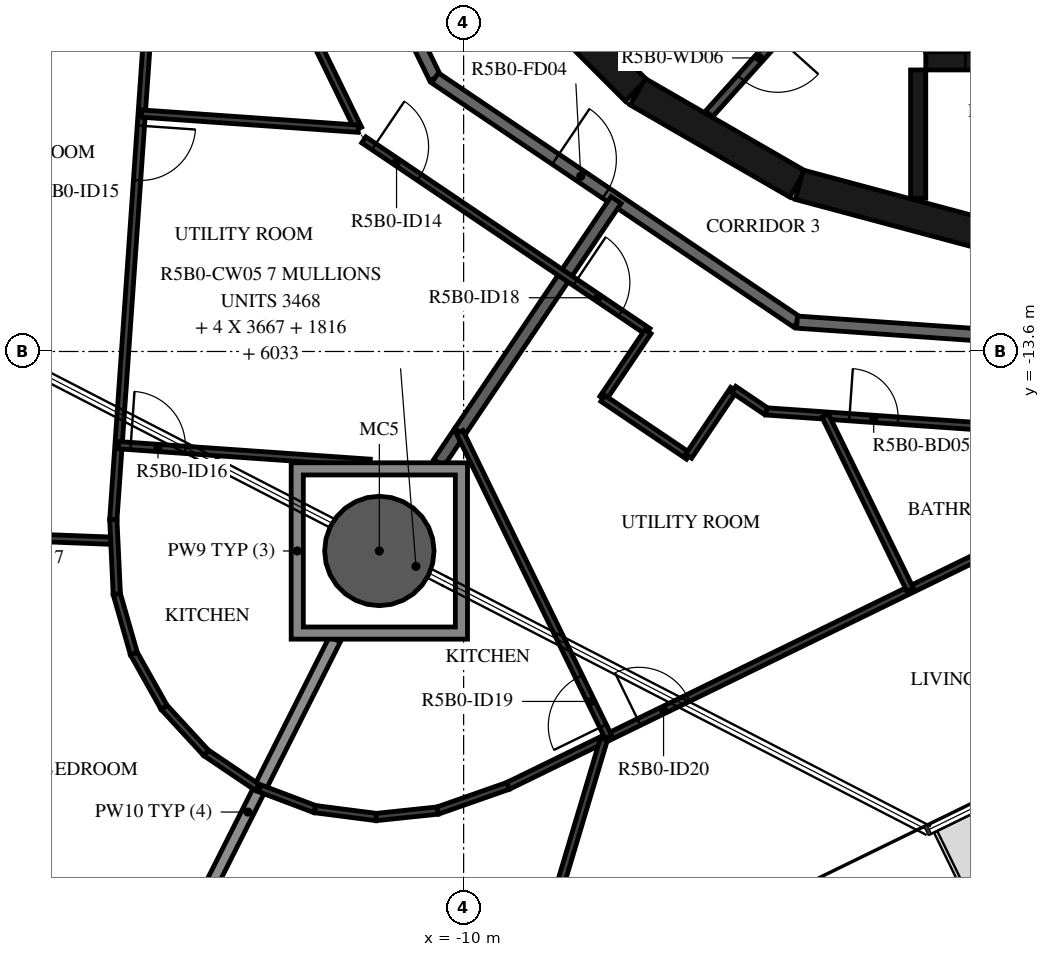
"""IFC4 building model, lengths in metres.
Left out: names, types, materials, properties, quantities, classifications, styles, units other than length and angle.
Written with IfcOpenShell. Run it as: python <this file> out.ifc"""

import sys

from ifc_helpers import new_model, si_unit, direction, frame, frame_2d, origin, origin_2d, place, context, subcontext, project, spatial, polyline, rectangle, hollow_circle, outline, extrude, element, fill, save


model = new_model("IFC4")
c1 = context("Model", 3, precision=1e-05, world=origin(), true_north=direction((0.0, 1.0)))
c2 = subcontext(c1, "Body", "Model", "MODEL_VIEW")
j1 = project(units=[si_unit("LENGTHUNIT", "METRE"), si_unit("PLANEANGLEUNIT", "RADIAN")], contexts=[c1])
p1 = place(None, origin())
s1 = spatial("IfcSite", under=j1, at=p1, CompositionType="ELEMENT")
p2 = place(p1, origin())
s2 = spatial("IfcBuilding", under=s1, at=p2, CompositionType="ELEMENT")
p3 = place(p2, frame((0.0, 0.0, 202.4)))
s3 = spatial("IfcBuildingStorey", under=s2, at=p3, CompositionType="ELEMENT", Elevation=202.4)
p4 = place(p3, frame((-11.386, -16.881, -0.38), z_axis=(0.0, 0.0, 1.0), x_axis=(1.0, 0.0, 0.0)))
e1 = element("IfcColumn", 1, at=p4, inside=s3, PredefinedType="COLUMN", context=c2, shape_type="SweptSolid", body=[
    extrude(hollow_circle(Radius=0.9, WallThickness=0.04, at=origin_2d()), origin(), (0.0, 0.0, 1.0), 3.5),
])
p5 = place(p3, frame((-9.308, -7.164, 0.0), z_axis=(0.0, 0.0, 1.0), x_axis=(0.707106781187, -0.707106781187, 0.0)))
e2 = element("IfcWall", 2, at=p5, inside=s3, PredefinedType="SHEAR", context=c2, shape_type="SweptSolid", body=[
    extrude(rectangle(XDim=3.032, YDim=0.5, at=frame_2d((1.516, 0.0))), origin(), (0.0, 0.0, 1.0), 3.12),
])
for number, where, z_axis, x_axis in (
    (3, (-7.137, -9.329, 0.0), (0.0, 0.0, 1.0), (0.866, -0.5, 0.0)),
    (4, (-4.479, -10.858, 0.0), (0.0, 0.0, 1.0), (0.966, -0.259, 0.0)),
):
    element("IfcWall", number, at=place(p3, frame(where, z_axis=z_axis, x_axis=x_axis)), inside=s3, PredefinedType="SHEAR", context=c2, shape_type="SweptSolid", body=[
        extrude(rectangle(XDim=3.033, YDim=0.5, at=frame_2d((1.516, 0.0))), origin(), (0.0, 0.0, 1.0), 3.12),
    ])
p6 = place(p3, frame((-2.4, -8.82, 0.0), z_axis=(0.0, 0.0, 1.0), x_axis=(1.0, 0.0, 0.0)))
e5 = element("IfcWall", 5, at=p6, inside=s3, PredefinedType="SHEAR", context=c2, shape_type="SweptSolid", body=[
    extrude(rectangle(XDim=2.5, YDim=0.3, at=frame_2d((1.25, 0.0))), origin(), (0.0, 0.0, 1.0), 3.12),
])
p7 = place(p6, frame((0.65, 0.0, 0.0)))
e6 = element("IfcOpeningElement", 6, at=p7, cuts=e5, PredefinedType="OPENING", context=c2, shape_type="SweptSolid", body=[
    extrude(rectangle(XDim=1.2, YDim=2.1, at=frame_2d((0.6, 1.05))), frame((0.0, 0.16, 0.0), z_axis=(0.0, -1.0, 0.0), x_axis=(1.0, 0.0, 0.0)), (0.0, 0.0, 1.0), 0.32),
])
p8 = place(p3, frame((-2.525, -8.97, 0.0), z_axis=(0.0, 0.0, 1.0), x_axis=(0.0, -1.0, 0.0)))
e7 = element("IfcWall", 7, at=p8, inside=s3, PredefinedType="SHEAR", context=c2, shape_type="SweptSolid", body=[
    extrude(rectangle(XDim=2.11, YDim=0.25, at=frame_2d((1.055, 0.0))), origin(), (0.0, 0.0, 1.0), 3.12),
])
p9 = place(p3, frame((-4.311, -7.851, 0.0), z_axis=(0.0, 0.0, 1.0), x_axis=(-0.667869133096, -0.744278725383, 0.0)))
e8 = element("IfcWall", 8, at=p9, inside=s3, PredefinedType="PARTITIONING", context=c2, shape_type="SweptSolid", body=[
    extrude(rectangle(XDim=2.476, YDim=0.15, at=frame_2d((1.238, 0.0))), origin(), (0.0, 0.0, 1.0), 3.12),
])
p10 = place(p9, frame((0.788, 0.0, 0.0)))
e9 = element("IfcOpeningElement", 9, at=p10, cuts=e8, PredefinedType="OPENING", context=c2, shape_type="SweptSolid", body=[
    extrude(rectangle(XDim=0.9, YDim=2.1, at=frame_2d((0.45, 1.05))), frame((0.0, 0.085, 0.0), z_axis=(0.0, -1.0, 0.0), x_axis=(1.0, 0.0, 0.0)), (0.0, 0.0, 1.0), 0.17),
])
p11 = place(p3, frame((-11.633, -6.716, 0.0), z_axis=(0.0, 0.0, 1.0), x_axis=(0.438322116278, -0.898817958422, 0.0)))
e10 = element("IfcWall", 10, at=p11, inside=s3, PredefinedType="STANDARD", context=c2, shape_type="SweptSolid", body=[
    extrude(rectangle(XDim=2.654, YDim=0.2, at=frame_2d((1.327, 0.0))), origin(), (0.0, 0.0, 1.0), 3.12),
])
p12 = place(p3, frame((-10.47, -9.101, 0.0), z_axis=(0.0, 0.0, 1.0), x_axis=(0.829035841718, -0.559195469534, 0.0)))
e11 = element("IfcWall", 11, at=p12, inside=s3, PredefinedType="STANDARD", context=c2, shape_type="SweptSolid", body=[
    extrude(rectangle(XDim=7.181, YDim=0.2, at=frame_2d((3.591, 0.0))), origin(), (0.0, 0.0, 1.0), 3.12),
])
p13 = place(p12, frame((2.39, 0.0, 0.0)))
e12 = element("IfcOpeningElement", 12, at=p13, cuts=e11, PredefinedType="OPENING", context=c2, shape_type="SweptSolid", body=[
    extrude(rectangle(XDim=1.0, YDim=2.1, at=frame_2d((0.5, 1.05))), frame((0.0, 0.11, 0.0), z_axis=(0.0, -1.0, 0.0), x_axis=(1.0, 0.0, 0.0)), (0.0, 0.0, 1.0), 0.22),
])
p14 = place(p3, frame((-4.517, -13.117, 0.0), z_axis=(0.0, 0.0, 1.0), x_axis=(0.997564669554, -0.069747616856, 0.0)))
e13 = element("IfcWall", 13, at=p14, inside=s3, PredefinedType="STANDARD", context=c2, shape_type="SweptSolid", body=[
    extrude(rectangle(XDim=6.885, YDim=0.2, at=frame_2d((3.443, 0.0))), origin(), (0.0, 0.0, 1.0), 3.12),
])
p15 = place(p14, frame((3.2, 0.0, 0.0)))
e14 = element("IfcOpeningElement", 14, at=p15, cuts=e13, PredefinedType="OPENING", context=c2, shape_type="SweptSolid", body=[
    extrude(rectangle(XDim=1.0, YDim=2.1, at=frame_2d((0.5, 1.05))), frame((0.0, 0.11, 0.0), z_axis=(0.0, -1.0, 0.0), x_axis=(1.0, 0.0, 0.0)), (0.0, 0.0, 1.0), 0.22),
])
p16 = place(p3, frame((-10.066, -14.924, 0.0), z_axis=(0.0, 0.0, 1.0), x_axis=(0.559173899945, 0.829050390278, 0.0)))
e15 = element("IfcWall", 15, at=p16, inside=s3, PredefinedType="STANDARD", context=c2, shape_type="SweptSolid", body=[
    extrude(rectangle(XDim=4.601, YDim=0.2, at=frame_2d((2.301, 0.0))), origin(), (0.0, 0.0, 1.0), 3.12),
])
p17 = place(p3, frame((-10.408, -15.43, 0.0), z_axis=(0.0, 0.0, 1.0), x_axis=(0.559390561924, 0.828904215956, 0.0)))
e16 = element("IfcWall", 16, at=p17, inside=s3, PredefinedType="STANDARD", context=c2, shape_type="SweptSolid", body=[
    extrude(rectangle(XDim=0.612, YDim=0.2, at=frame_2d((0.306, 0.0))), origin(), (0.0, 0.0, 1.0), 3.12),
])
p18 = place(p3, frame((-14.979, -24.017, 0.0), z_axis=(0.0, 0.0, 1.0), x_axis=(0.449711952388, 0.893173644864, 0.0)))
e17 = element("IfcWall", 17, at=p18, inside=s3, PredefinedType="STANDARD", context=c2, shape_type="SweptSolid", body=[
    extrude(rectangle(XDim=6.367, YDim=0.2, at=frame_2d((3.184, 0.0))), origin(), (0.0, 0.0, 1.0), 2.73),
])
p19 = place(p3, frame((-14.383, -4.5, 0.0), z_axis=(0.0, 0.0, 1.0), x_axis=(0.438393414895, -0.898783185077, 0.0)))
e18 = element("IfcWall", 18, at=p19, inside=s3, PredefinedType="PARTITIONING", context=c2, shape_type="SweptSolid", body=[
    extrude(rectangle(XDim=6.049, YDim=0.12, at=frame_2d((3.024, 0.0))), origin(), (0.0, 0.0, 1.0), 3.12),
])
p20 = place(p19, frame((0.4, 0.0, 0.0)))
e19 = element("IfcOpeningElement", 19, at=p20, cuts=e18, PredefinedType="OPENING", context=c2, shape_type="SweptSolid", body=[
    extrude(rectangle(XDim=0.8, YDim=2.1, at=frame_2d((0.4, 1.05))), frame((0.0, 0.07, 0.0), z_axis=(0.0, -1.0, 0.0), x_axis=(1.0, 0.0, 0.0)), (0.0, 0.0, 1.0), 0.14),
])
p21 = place(p3, frame((-11.642, -10.12, 0.0), z_axis=(0.0, 0.0, 1.0), x_axis=(0.829033377599, -0.559199122698, 0.0)))
e20 = element("IfcWall", 20, at=p21, inside=s3, PredefinedType="PARTITIONING", context=c2, shape_type="SweptSolid", body=[
    extrude(rectangle(XDim=5.638, YDim=0.12, at=frame_2d((2.819, 0.0))), origin(), (0.0, 0.0, 1.0), 3.12),
])
p22 = place(p21, frame((0.2, 0.0, 0.0)))
e21 = element("IfcOpeningElement", 21, at=p22, cuts=e20, PredefinedType="OPENING", context=c2, shape_type="SweptSolid", body=[
    extrude(rectangle(XDim=0.9, YDim=2.1, at=frame_2d((0.45, 1.05))), frame((0.0, 0.07, 0.0), z_axis=(0.0, -1.0, 0.0), x_axis=(1.0, 0.0, 0.0)), (0.0, 0.0, 1.0), 0.14),
])
p23 = place(p21, frame((4.192, 0.0, 0.0)))
e22 = element("IfcOpeningElement", 22, at=p23, cuts=e20, PredefinedType="OPENING", context=c2, shape_type="SweptSolid", body=[
    extrude(rectangle(XDim=0.9, YDim=2.1, at=frame_2d((0.45, 1.05))), frame((0.0, 0.07, 0.0), z_axis=(0.0, -1.0, 0.0), x_axis=(1.0, 0.0, 0.0)), (0.0, 0.0, 1.0), 0.14),
])
p24 = place(p3, frame((-14.931, -4.5, 0.0), z_axis=(0.0, 0.0, 1.0), x_axis=(-0.069751708439, -0.997564383471, 0.0)))
e23 = element("IfcWall", 23, at=p24, inside=s3, PredefinedType="PARTITIONING", context=c2, shape_type="SweptSolid", body=[
    extrude(rectangle(XDim=11.894, YDim=0.12, at=frame_2d((5.947, 0.0))), origin(), (0.0, 0.0, 1.0), 3.12),
])
p25 = place(p24, frame((5.4, 0.0, 0.0)))
e24 = element("IfcOpeningElement", 24, at=p25, cuts=e23, PredefinedType="OPENING", context=c2, shape_type="SweptSolid", body=[
    extrude(rectangle(XDim=0.9, YDim=2.1, at=frame_2d((0.45, 1.05))), frame((0.0, 0.07, 0.0), z_axis=(0.0, -1.0, 0.0), x_axis=(1.0, 0.0, 0.0)), (0.0, 0.0, 1.0), 0.14),
])
p26 = place(p3, frame((-15.294, -9.688, 0.0), z_axis=(0.0, 0.0, 1.0), x_axis=(0.997565819809, -0.069731163391, 0.0)))
e25 = element("IfcWall", 25, at=p26, inside=s3, PredefinedType="PARTITIONING", context=c2, shape_type="SweptSolid", body=[
    extrude(rectangle(XDim=3.571, YDim=0.12, at=frame_2d((1.786, 0.0))), origin(), (0.0, 0.0, 1.0), 3.12),
])
p27 = place(p3, frame((-19.355, -16.575, 0.0), z_axis=(0.0, 0.0, 1.0), x_axis=(0.999268343647, -0.038246272823, 0.0)))
e26 = element("IfcWall", 26, at=p27, inside=s3, PredefinedType="PARTITIONING", context=c2, shape_type="SweptSolid", body=[
    extrude(rectangle(XDim=3.613, YDim=0.12, at=frame_2d((1.807, 0.0))), origin(), (0.0, 0.0, 1.0), 3.12),
])
p28 = place(p27, frame((0.2, 0.0, 0.0)))
e27 = element("IfcOpeningElement", 27, at=p28, cuts=e26, PredefinedType="OPENING", context=c2, shape_type="SweptSolid", body=[
    extrude(rectangle(XDim=0.9, YDim=2.1, at=frame_2d((0.45, 1.05))), frame((0.0, 0.07, 0.0), z_axis=(0.0, -1.0, 0.0), x_axis=(1.0, 0.0, 0.0)), (0.0, 0.0, 1.0), 0.14),
])
p29 = place(p3, frame((-15.704, -17.59, 0.0), z_axis=(0.0, 0.0, 1.0), x_axis=(-0.046364428258, 0.998924591645, 0.0)))
e28 = element("IfcWall", 28, at=p29, inside=s3, PredefinedType="PARTITIONING", context=c2, shape_type="SweptSolid", body=[
    extrude(rectangle(XDim=1.227, YDim=0.12, at=frame_2d((0.613, 0.0))), origin(), (0.0, 0.0, 1.0), 3.12),
])
p30 = place(p3, frame((-15.675, -15.141, 0.0), z_axis=(0.0, 0.0, 1.0), x_axis=(0.997563107735, -0.06976995117, 0.0)))
e29 = element("IfcWall", 29, at=p30, inside=s3, PredefinedType="PARTITIONING", context=c2, shape_type="SweptSolid", body=[
    extrude(rectangle(XDim=4.146, YDim=0.12, at=frame_2d((2.073, 0.0))), origin(), (0.0, 0.0, 1.0), 3.12),
])
p31 = place(p30, frame((0.2, 0.0, 0.0)))
e30 = element("IfcOpeningElement", 30, at=p31, cuts=e29, PredefinedType="OPENING", context=c2, shape_type="SweptSolid", body=[
    extrude(rectangle(XDim=0.9, YDim=2.1, at=frame_2d((0.45, 1.05))), frame((0.0, 0.07, 0.0), z_axis=(0.0, -1.0, 0.0), x_axis=(1.0, 0.0, 0.0)), (0.0, 0.0, 1.0), 0.14),
])
for number, where, z_axis, x_axis in (
    (31, (-13.395, -20.767, 0.0), (0.0, 0.0, 1.0), (-0.829, 0.559, 0.0)),
    (32, (-14.237, -20.199, 0.0), (0.0, 0.0, 1.0), (-0.678, 0.735, 0.0)),
):
    element("IfcWall", number, at=place(p3, frame(where, z_axis=z_axis, x_axis=x_axis)), inside=s3, PredefinedType="PARTITIONING", context=c2, shape_type="SweptSolid", body=[
        extrude(rectangle(XDim=1.016, YDim=0.12, at=frame_2d((0.508, 0.0))), origin(), (0.0, 0.0, 1.0), 3.12),
    ])
p32 = place(p3, frame((-14.926, -19.452, 0.0), z_axis=(0.0, 0.0, 1.0), x_axis=(-0.489941776958, 0.871755157823, 0.0)))
e33 = element("IfcWall", 33, at=p32, inside=s3, PredefinedType="PARTITIONING", context=c2, shape_type="SweptSolid", body=[
    extrude(rectangle(XDim=1.016, YDim=0.12, at=frame_2d((0.508, 0.0))), origin(), (0.0, 0.0, 1.0), 3.12),
])
p33 = place(p3, frame((-15.424, -18.567, 0.0), z_axis=(0.0, 0.0, 1.0), x_axis=(-0.275641454312, 0.961260520704, 0.0)))
e34 = element("IfcWall", 34, at=p33, inside=s3, PredefinedType="PARTITIONING", context=c2, shape_type="SweptSolid", body=[
    extrude(rectangle(XDim=1.016, YDim=0.12, at=frame_2d((0.508, 0.0))), origin(), (0.0, 0.0, 1.0), 3.12),
])
p34 = place(p3, frame((-6.968, -13.273, 0.0), z_axis=(0.0, 0.0, 1.0), x_axis=(-0.559283007371, -0.828976789582, 0.0)))
e35 = element("IfcWall", 35, at=p34, inside=s3, PredefinedType="PARTITIONING", context=c2, shape_type="SweptSolid", body=[
    extrude(rectangle(XDim=1.325, YDim=0.12, at=frame_2d((0.663, 0.0))), origin(), (0.0, 0.0, 1.0), 3.12),
])
p35 = place(p3, frame((-7.709, -14.371, 0.0), z_axis=(0.0, 0.0, 1.0), x_axis=(0.829033422808, -0.559199055675, 0.0)))
e36 = element("IfcWall", 36, at=p35, inside=s3, PredefinedType="PARTITIONING", context=c2, shape_type="SweptSolid", body=[
    extrude(rectangle(XDim=1.7, YDim=0.12, at=frame_2d((0.85, 0.0))), origin(), (0.0, 0.0, 1.0), 3.12),
])
p36 = place(p3, frame((-6.3, -15.322, 0.0), z_axis=(0.0, 0.0, 1.0), x_axis=(0.559197608403, 0.829034399019, 0.0)))
e37 = element("IfcWall", 37, at=p36, inside=s3, PredefinedType="PARTITIONING", context=c2, shape_type="SweptSolid", body=[
    extrude(rectangle(XDim=1.325, YDim=0.12, at=frame_2d((0.663, 0.0))), origin(), (0.0, 0.0, 1.0), 3.12),
])
p37 = place(p3, frame((-5.559, -14.223, 0.0), z_axis=(0.0, 0.0, 1.0), x_axis=(0.828844300469, -0.559479334363, 0.0)))
e38 = element("IfcWall", 38, at=p37, inside=s3, PredefinedType="PARTITIONING", context=c2, shape_type="SweptSolid", body=[
    extrude(rectangle(XDim=0.647, YDim=0.12, at=frame_2d((0.324, 0.0))), origin(), (0.0, 0.0, 1.0), 3.12),
])
p38 = place(p3, frame((-5.022, -14.585, 0.0), z_axis=(0.0, 0.0, 1.0), x_axis=(0.997564196041, -0.06975438895, 0.0)))
e39 = element("IfcWall", 39, at=p38, inside=s3, PredefinedType="PARTITIONING", context=c2, shape_type="SweptSolid", body=[
    extrude(rectangle(XDim=7.346, YDim=0.12, at=frame_2d((3.673, 0.0))), origin(), (0.0, 0.0, 1.0), 3.12),
])
p39 = place(p38, frame((1.37, 0.0, 0.0)))
e40 = element("IfcOpeningElement", 40, at=p39, cuts=e39, PredefinedType="OPENING", context=c2, shape_type="SweptSolid", body=[
    extrude(rectangle(XDim=0.8, YDim=2.1, at=frame_2d((0.4, 1.05))), frame((0.0, 0.07, 0.0), z_axis=(0.0, -1.0, 0.0), x_axis=(1.0, 0.0, 0.0)), (0.0, 0.0, 1.0), 0.14),
])
p40 = place(p3, frame((-13.351, -20.784, 0.0), z_axis=(0.0, 0.0, 1.0), x_axis=(0.935644105077, -0.352944908781, 0.0)))
e41 = element("IfcWall", 41, at=p40, inside=s3, PredefinedType="PARTITIONING", context=c2, shape_type="SweptSolid", body=[
    extrude(rectangle(XDim=0.969, YDim=0.12, at=frame_2d((0.484, 0.0))), origin(), (0.0, 0.0, 1.0), 3.12),
])
p41 = place(p3, frame((-12.445, -21.126, 0.0), z_axis=(0.0, 0.0, 1.0), x_axis=(0.991824046735, -0.127612931625, 0.0)))
e42 = element("IfcWall", 42, at=p41, inside=s3, PredefinedType="PARTITIONING", context=c2, shape_type="SweptSolid", body=[
    extrude(rectangle(XDim=1.016, YDim=0.12, at=frame_2d((0.508, 0.0))), origin(), (0.0, 0.0, 1.0), 3.12),
])
p42 = place(p3, frame((-11.437, -21.256, 0.0), z_axis=(0.0, 0.0, 1.0), x_axis=(0.994522555527, 0.104522182086, 0.0)))
e43 = element("IfcWall", 43, at=p42, inside=s3, PredefinedType="PARTITIONING", context=c2, shape_type="SweptSolid", body=[
    extrude(rectangle(XDim=1.016, YDim=0.12, at=frame_2d((0.508, 0.0))), origin(), (0.0, 0.0, 1.0), 3.12),
])
p43 = place(p3, frame((-10.427, -21.149, 0.0), z_axis=(0.0, 0.0, 1.0), x_axis=(0.943591256744, 0.331112579338, 0.0)))
e44 = element("IfcWall", 44, at=p43, inside=s3, PredefinedType="PARTITIONING", context=c2, shape_type="SweptSolid", body=[
    extrude(rectangle(XDim=1.227, YDim=0.12, at=frame_2d((0.613, 0.0))), origin(), (0.0, 0.0, 1.0), 3.12),
])
p44 = place(p3, frame((-9.269, -20.743, 0.0), z_axis=(0.0, 0.0, 1.0), x_axis=(0.898796865831, 0.438365365846, 0.0)))
e45 = element("IfcWall", 45, at=p44, inside=s3, PredefinedType="PARTITIONING", context=c2, shape_type="SweptSolid", body=[
    extrude(rectangle(XDim=12.879, YDim=0.12, at=frame_2d((6.439, 0.0))), origin(), (0.0, 0.0, 1.0), 3.12),
])
p45 = place(p44, frame((2.395, 0.0, 0.0)))
e46 = element("IfcOpeningElement", 46, at=p45, cuts=e45, PredefinedType="OPENING", context=c2, shape_type="SweptSolid", body=[
    extrude(rectangle(XDim=0.9, YDim=2.1, at=frame_2d((0.45, 1.05))), frame((0.0, 0.07, 0.0), z_axis=(0.0, -1.0, 0.0), x_axis=(1.0, 0.0, 0.0)), (0.0, 0.0, 1.0), 0.14),
])
p46 = place(p3, frame((-7.62, -19.939, 0.0), z_axis=(0.0, 0.0, 1.0), x_axis=(-0.438353807908, 0.89880250283, 0.0)))
e47 = element("IfcWall", 47, at=p46, inside=s3, PredefinedType="PARTITIONING", context=c2, shape_type="SweptSolid", body=[
    extrude(rectangle(XDim=5.58, YDim=0.12, at=frame_2d((2.79, 0.0))), origin(), (0.0, 0.0, 1.0), 3.12),
])
p47 = place(p46, frame((0.2, 0.0, 0.0)))
e48 = element("IfcOpeningElement", 48, at=p47, cuts=e47, PredefinedType="OPENING", context=c2, shape_type="SweptSolid", body=[
    extrude(rectangle(XDim=0.9, YDim=2.1, at=frame_2d((0.45, 1.05))), frame((0.0, 0.07, 0.0), z_axis=(0.0, -1.0, 0.0), x_axis=(1.0, 0.0, 0.0)), (0.0, 0.0, 1.0), 0.14),
])
p48 = place(p3, frame((-9.041, -24.479, 0.0), z_axis=(0.0, 0.0, 1.0), x_axis=(0.286804727102, 0.957989064923, 0.0)))
e49 = element("IfcWall", 49, at=p48, inside=s3, PredefinedType="PARTITIONING", context=c2, shape_type="SweptSolid", body=[
    extrude(rectangle(XDim=4.701, YDim=0.12, at=frame_2d((2.351, 0.0))), origin(), (0.0, 0.0, 1.0), 3.12),
])
p49 = place(p48, frame((0.6, 0.0, 0.0)))
e50 = element("IfcOpeningElement", 50, at=p49, cuts=e49, PredefinedType="OPENING", context=c2, shape_type="SweptSolid", body=[
    extrude(rectangle(XDim=0.9, YDim=2.1, at=frame_2d((0.45, 1.05))), frame((0.0, 0.07, 0.0), z_axis=(0.0, -1.0, 0.0), x_axis=(1.0, 0.0, 0.0)), (0.0, 0.0, 1.0), 0.14),
])
p50 = place(p3, frame((-2.657, -17.518, 0.0), z_axis=(0.0, 0.0, 1.0), x_axis=(-0.438339139088, 0.898809656792, 0.0)))
e51 = element("IfcWall", 51, at=p50, inside=s3, PredefinedType="PARTITIONING", context=c2, shape_type="SweptSolid", body=[
    extrude(rectangle(XDim=3.188, YDim=0.12, at=frame_2d((1.594, 0.0))), origin(), (0.0, 0.0, 1.0), 3.12),
])
p51 = place(p3, origin())
e52 = element("IfcWall", 52, at=p51, inside=s3, PredefinedType="STANDARD", context=c2, shape_type="SweptSolid", body=[
    extrude(outline(polyline([(-9.936, -15.43), (-9.936, -18.331), (-12.836, -18.331), (-12.836, -15.43), (-9.936, -15.43)]), holes=[polyline([(-12.636, -18.131), (-10.136, -18.131), (-10.136, -15.631), (-12.636, -15.631), (-12.636, -18.131)])]), origin(), (0.0, 0.0, 1.0), 3.12),
])
p52 = place(p7, origin())
e53 = element("IfcDoor", 53, at=p52, inside=s3, OperationType="SINGLE_SWING_LEFT", PredefinedType="DOOR", context=c2, shape_type="SweptSolid", body=[
    extrude(rectangle(XDim=1.2, YDim=2.1, at=frame_2d((0.6, 1.05))), frame((0.0, 0.025, 0.0), z_axis=(0.0, -1.0, 0.0), x_axis=(1.0, 0.0, 0.0)), (0.0, 0.0, 1.0), 0.05),
])
fill(e6, e53)
p53 = place(p10, origin())
e54 = element("IfcDoor", 54, at=p53, inside=s3, OperationType="SINGLE_SWING_RIGHT", PredefinedType="DOOR", context=c2, shape_type="SweptSolid", body=[
    extrude(rectangle(XDim=0.9, YDim=2.1, at=frame_2d((0.45, 1.05))), frame((0.0, 0.025, 0.0), z_axis=(0.0, -1.0, 0.0), x_axis=(1.0, 0.0, 0.0)), (0.0, 0.0, 1.0), 0.05),
])
fill(e9, e54)
p54 = place(p13, origin())
e55 = element("IfcDoor", 55, at=p54, inside=s3, OperationType="SINGLE_SWING_RIGHT", PredefinedType="DOOR", context=c2, shape_type="SweptSolid", body=[
    extrude(rectangle(XDim=1.0, YDim=2.1, at=frame_2d((0.5, 1.05))), frame((0.0, 0.025, 0.0), z_axis=(0.0, -1.0, 0.0), x_axis=(1.0, 0.0, 0.0)), (0.0, 0.0, 1.0), 0.05),
])
fill(e12, e55)
p55 = place(p22, origin())
e56 = element("IfcDoor", 56, at=p55, inside=s3, OperationType="SINGLE_SWING_RIGHT", PredefinedType="DOOR", context=c2, shape_type="SweptSolid", body=[
    extrude(rectangle(XDim=0.9, YDim=2.1, at=frame_2d((0.45, 1.05))), frame((0.0, 0.025, 0.0), z_axis=(0.0, -1.0, 0.0), x_axis=(1.0, 0.0, 0.0)), (0.0, 0.0, 1.0), 0.05),
])
fill(e21, e56)
p56 = place(p25, origin())
e57 = element("IfcDoor", 57, at=p56, inside=s3, OperationType="SINGLE_SWING_RIGHT", PredefinedType="DOOR", context=c2, shape_type="SweptSolid", body=[
    extrude(rectangle(XDim=0.9, YDim=2.1, at=frame_2d((0.45, 1.05))), frame((0.0, 0.025, 0.0), z_axis=(0.0, -1.0, 0.0), x_axis=(1.0, 0.0, 0.0)), (0.0, 0.0, 1.0), 0.05),
])
fill(e24, e57)
p57 = place(p31, origin())
e58 = element("IfcDoor", 58, at=p57, inside=s3, OperationType="SINGLE_SWING_RIGHT", PredefinedType="DOOR", context=c2, shape_type="SweptSolid", body=[
    extrude(rectangle(XDim=0.9, YDim=2.1, at=frame_2d((0.45, 1.05))), frame((0.0, 0.025, 0.0), z_axis=(0.0, -1.0, 0.0), x_axis=(1.0, 0.0, 0.0)), (0.0, 0.0, 1.0), 0.05),
])
fill(e30, e58)
p58 = place(p23, origin())
e59 = element("IfcDoor", 59, at=p58, inside=s3, OperationType="SINGLE_SWING_LEFT", PredefinedType="DOOR", context=c2, shape_type="SweptSolid", body=[
    extrude(rectangle(XDim=0.9, YDim=2.1, at=frame_2d((0.45, 1.05))), frame((0.0, 0.025, 0.0), z_axis=(0.0, -1.0, 0.0), x_axis=(1.0, 0.0, 0.0)), (0.0, 0.0, 1.0), 0.05),
])
fill(e22, e59)
p59 = place(p39, origin())
e60 = element("IfcDoor", 60, at=p59, inside=s3, OperationType="SINGLE_SWING_LEFT", PredefinedType="DOOR", context=c2, shape_type="SweptSolid", body=[
    extrude(rectangle(XDim=0.8, YDim=2.1, at=frame_2d((0.4, 1.05))), frame((0.0, 0.025, 0.0), z_axis=(0.0, -1.0, 0.0), x_axis=(1.0, 0.0, 0.0)), (0.0, 0.0, 1.0), 0.05),
])
fill(e40, e60)
p60 = place(p47, origin())
e61 = element("IfcDoor", 61, at=p60, inside=s3, OperationType="SINGLE_SWING_LEFT", PredefinedType="DOOR", context=c2, shape_type="SweptSolid", body=[
    extrude(rectangle(XDim=0.9, YDim=2.1, at=frame_2d((0.45, 1.05))), frame((0.0, 0.025, 0.0), z_axis=(0.0, -1.0, 0.0), x_axis=(1.0, 0.0, 0.0)), (0.0, 0.0, 1.0), 0.05),
])
fill(e48, e61)
p61 = place(p45, origin())
e62 = element("IfcDoor", 62, at=p61, inside=s3, OperationType="SINGLE_SWING_LEFT", PredefinedType="DOOR", context=c2, shape_type="SweptSolid", body=[
    extrude(rectangle(XDim=0.9, YDim=2.1, at=frame_2d((0.45, 1.05))), frame((0.0, 0.025, 0.0), z_axis=(0.0, -1.0, 0.0), x_axis=(1.0, 0.0, 0.0)), (0.0, 0.0, 1.0), 0.05),
])
fill(e46, e62)
save(model, sys.argv[1])
